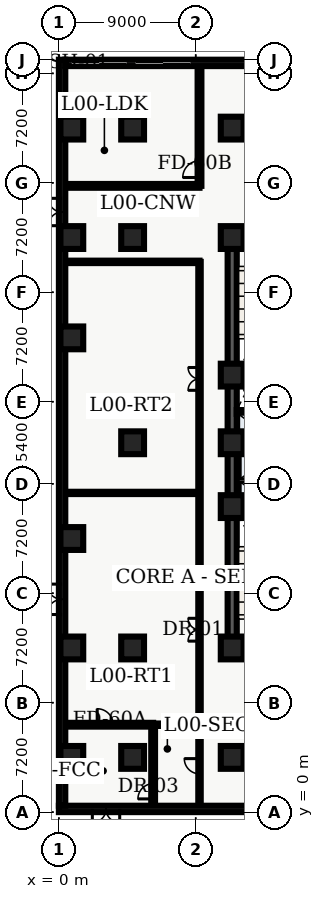
"""IFC4 building model, lengths in metres.
Left out: names, types, materials, properties, quantities, classifications, styles, units other than length and angle.
Written with IfcOpenShell. Run it as: python <this file> out.ifc"""

import sys

from ifc_helpers import new_model, entity, si_unit, converted_unit, direction, frame, origin_with_axes, origin_2d_with_axis, place, context, subcontext, project, spatial, polyline, rectangle, outline, extrude, element, fill, save


model = new_model("IFC4")
c1 = context("Model", 3, precision=1e-05, world=origin_with_axes(), true_north=direction((0.0, 1.0)))
c2 = subcontext(c1, "Body", "Model", "MODEL_VIEW")
j1 = project(units=[si_unit("LENGTHUNIT", "METRE"), converted_unit("PLANEANGLEUNIT", "DEGREE", entity("IfcPlaneAngleMeasure", 0.017), si_unit("PLANEANGLEUNIT", "RADIAN"), dimensions=[0, 0, 0, 0, 0, 0, 0])], contexts=[c1])
p1 = place(None, origin_with_axes())
s1 = spatial("IfcSite", under=j1, at=p1, CompositionType="ELEMENT")
p2 = place(p1, origin_with_axes())
s2 = spatial("IfcBuilding", under=s1, at=p2, CompositionType="ELEMENT")
p3 = place(p2, origin_with_axes())
s3 = spatial("IfcBuildingStorey", under=s2, at=p3, CompositionType="ELEMENT", Elevation=0.0)
p4 = place(p3, frame((11.4, 10.8, 0.0), z_axis=(0.0, 0.0, 1.0), x_axis=(0.0, 1.0, 0.0)))
e1 = element("IfcWall", 1, at=p4, inside=s3, PredefinedType="SHEAR", context=c2, shape_type="SweptSolid", body=[
    extrude(outline(polyline([(0.0, -0.3), (27.0, -0.3), (27.0, 0.3), (0.0, 0.3), (0.0, -0.3)])), origin_with_axes(), (0.0, 0.0, 1.0), 5.46),
])
p5 = place(p3, frame((18.6, 10.8, 0.0), z_axis=(0.0, 0.0, 1.0), x_axis=(-1.0, 0.0, 0.0)))
e2 = element("IfcWall", 2, at=p5, inside=s3, PredefinedType="SHEAR", context=c2, shape_type="SweptSolid", body=[
    extrude(outline(polyline([(0.0, -0.3), (7.2, -0.3), (7.2, 0.3), (0.0, 0.3), (0.0, -0.3)])), origin_with_axes(), (0.0, 0.0, 1.0), 5.46),
])
p6 = place(p5, frame((4.575, 0.0, 0.0), z_axis=(0.0, 0.0, 1.0), x_axis=(1.0, 0.0, 0.0)))
e3 = element("IfcOpeningElement", 3, at=p6, cuts=e2, PredefinedType="OPENING", context=c2, shape_type="SweptSolid", body=[
    extrude(rectangle(XDim=1.05, YDim=0.62, at=origin_2d_with_axis()), origin_with_axes(), (0.0, 0.0, 1.0), 2.15),
])
p7 = place(p3, frame((11.4, 37.8, 0.0), z_axis=(0.0, 0.0, 1.0), x_axis=(1.0, 0.0, 0.0)))
e4 = element("IfcWall", 4, at=p7, inside=s3, PredefinedType="SHEAR", context=c2, shape_type="SweptSolid", body=[
    extrude(outline(polyline([(0.0, -0.3), (7.2, -0.3), (7.2, 0.3), (0.0, 0.3), (0.0, -0.3)])), origin_with_axes(), (0.0, 0.0, 1.0), 5.46),
])
p8 = place(p7, frame((2.625, 0.0, 0.0), z_axis=(0.0, 0.0, 1.0), x_axis=(1.0, 0.0, 0.0)))
e5 = element("IfcOpeningElement", 5, at=p8, cuts=e4, PredefinedType="OPENING", context=c2, shape_type="SweptSolid", body=[
    extrude(rectangle(XDim=1.05, YDim=0.62, at=origin_2d_with_axis()), origin_with_axes(), (0.0, 0.0, 1.0), 2.15),
])
for number, where, z_axis, x_axis in (
    (6, (11.7, 19.825, 0.0), (0.0, 0.0, 1.0), (1.0, 0.0, 0.0)),
    (7, (11.7, 28.775, 0.0), (0.0, 0.0, 1.0), (1.0, 0.0, 0.0)),
):
    element("IfcWall", number, at=place(p3, frame(where, z_axis=z_axis, x_axis=x_axis)), inside=s3, PredefinedType="SHEAR", context=c2, shape_type="SweptSolid", body=[
        extrude(outline(polyline([(0.0, -0.125), (6.6, -0.125), (6.6, 0.125), (0.0, 0.125), (0.0, -0.125)])), origin_with_axes(), (0.0, 0.0, 1.0), 5.46),
    ])
p9 = place(p3, frame((11.7, 24.1, 0.0), z_axis=(0.0, 0.0, 1.0), x_axis=(1.0, 0.0, 0.0)))
e8 = element("IfcWall", 8, at=p9, inside=s3, PredefinedType="SOLIDWALL", context=c2, shape_type="SweptSolid", body=[
    extrude(outline(polyline([(0.0, -0.125), (6.6, -0.125), (6.6, 0.125), (0.0, 0.125), (0.0, -0.125)])), origin_with_axes(), (0.0, 0.0, 1.0), 3.6),
])
p10 = place(p9, frame((3.75, 0.0, 0.0), z_axis=(0.0, 0.0, 1.0), x_axis=(1.0, 0.0, 0.0)))
e9 = element("IfcOpeningElement", 9, at=p10, cuts=e8, PredefinedType="OPENING", context=c2, shape_type="SweptSolid", body=[
    extrude(rectangle(XDim=0.9, YDim=0.27, at=origin_2d_with_axis()), origin_with_axes(), (0.0, 0.0, 1.0), 2.15),
])
p11 = place(p3, frame((11.7, 26.325, 0.0), z_axis=(0.0, 0.0, 1.0), x_axis=(1.0, 0.0, 0.0)))
e10 = element("IfcWall", 10, at=p11, inside=s3, PredefinedType="SOLIDWALL", context=c2, shape_type="SweptSolid", body=[
    extrude(outline(polyline([(0.0, -0.125), (6.6, -0.125), (6.6, 0.125), (0.0, 0.125), (0.0, -0.125)])), origin_with_axes(), (0.0, 0.0, 1.0), 3.6),
])
p12 = place(p11, frame((3.5, 0.0, 0.0), z_axis=(0.0, 0.0, 1.0), x_axis=(1.0, 0.0, 0.0)))
e11 = element("IfcOpeningElement", 11, at=p12, cuts=e10, PredefinedType="OPENING", context=c2, shape_type="SweptSolid", body=[
    extrude(rectangle(XDim=0.9, YDim=0.27, at=origin_2d_with_axis()), origin_with_axes(), (0.0, 0.0, 1.0), 2.15),
])
for number, where, z_axis, x_axis in (
    (12, (11.4, 3.6, 0.0), (0.0, 0.0, 1.0), (1.0, 0.0, 0.0)),
    (13, (11.4, 10.8, 0.0), (0.0, 0.0, 1.0), (1.0, 0.0, 0.0)),
    (14, (11.4, 20.1, 0.0), (0.0, 0.0, 1.0), (1.0, 0.0, 0.0)),
    (15, (11.4, 24.3, 0.0), (0.0, 0.0, 1.0), (1.0, 0.0, 0.0)),
    (16, (11.4, 28.75, 0.0), (0.0, 0.0, 1.0), (1.0, 0.0, 0.0)),
    (17, (11.4, 37.8, 0.0), (0.0, 0.0, 1.0), (1.0, 0.0, 0.0)),
    (18, (11.4, 45.0, 0.0), (0.0, 0.0, 1.0), (1.0, 0.0, 0.0)),
    (19, (4.85, 3.6, 0.0), (0.0, 0.0, 1.0), (1.0, 0.0, 0.0)),
    (20, (4.85, 10.8, 0.0), (0.0, 0.0, 1.0), (1.0, 0.0, 0.0)),
    (21, (4.85, 24.3, 0.0), (0.0, 0.0, 1.0), (1.0, 0.0, 0.0)),
    (22, (4.85, 37.8, 0.0), (0.0, 0.0, 1.0), (1.0, 0.0, 0.0)),
    (23, (4.85, 45.0, 0.0), (0.0, 0.0, 1.0), (1.0, 0.0, 0.0)),
    (24, (0.85, 3.6, 0.0), (0.0, 0.0, 1.0), (1.0, 0.0, 0.0)),
    (25, (0.85, 10.8, 0.0), (0.0, 0.0, 1.0), (1.0, 0.0, 0.0)),
    (26, (0.85, 18.0, 0.0), (0.0, 0.0, 1.0), (1.0, 0.0, 0.0)),
    (27, (0.85, 31.2, 0.0), (0.0, 0.0, 1.0), (1.0, 0.0, 0.0)),
    (28, (0.85, 37.8, 0.0), (0.0, 0.0, 1.0), (1.0, 0.0, 0.0)),
    (29, (0.85, 45.0, 0.0), (0.0, 0.0, 1.0), (1.0, 0.0, 0.0)),
):
    element("IfcColumn", number, at=place(p3, frame(where, z_axis=z_axis, x_axis=x_axis)), inside=s3, PredefinedType="COLUMN", context=c2, shape_type="SweptSolid", body=[
        extrude(rectangle(XDim=1.5, YDim=1.5, at=origin_2d_with_axis()), origin_with_axes(), (0.0, 0.0, 1.0), 5.7),
    ])
p13 = place(p3, frame((0.42, 5.75, 0.0), z_axis=(0.0, 0.0, 1.0), x_axis=(1.0, 0.0, 0.0)))
e30 = element("IfcWall", 30, at=p13, inside=s3, PredefinedType="SOLIDWALL", context=c2, shape_type="SweptSolid", body=[
    extrude(outline(polyline([(0.0, -0.125), (5.78, -0.125), (5.78, 0.125), (0.0, 0.125), (0.0, -0.125)])), origin_with_axes(), (0.0, 0.0, 1.0), 3.2),
])
p14 = place(p13, frame((2.625, 0.0, 0.0), z_axis=(0.0, 0.0, 1.0), x_axis=(1.0, 0.0, 0.0)))
e31 = element("IfcOpeningElement", 31, at=p14, cuts=e30, PredefinedType="OPENING", context=c2, shape_type="SweptSolid", body=[
    extrude(rectangle(XDim=1.05, YDim=0.27, at=origin_2d_with_axis()), origin_with_axes(), (0.0, 0.0, 1.0), 2.15),
])
p15 = place(p3, frame((6.2, 0.42, 0.0), z_axis=(0.0, 0.0, 1.0), x_axis=(0.0, 1.0, 0.0)))
e32 = element("IfcWall", 32, at=p15, inside=s3, PredefinedType="SOLIDWALL", context=c2, shape_type="SweptSolid", body=[
    extrude(outline(polyline([(0.0, -0.125), (5.33, -0.125), (5.33, 0.125), (0.0, 0.125), (0.0, -0.125)])), origin_with_axes(), (0.0, 0.0, 1.0), 3.2),
])
p16 = place(p15, frame((0.95, 0.0, 0.0), z_axis=(0.0, 0.0, 1.0), x_axis=(1.0, 0.0, 0.0)))
e33 = element("IfcOpeningElement", 33, at=p16, cuts=e32, PredefinedType="OPENING", context=c2, shape_type="SweptSolid", body=[
    extrude(rectangle(XDim=1.0, YDim=0.27, at=origin_2d_with_axis()), origin_with_axes(), (0.0, 0.0, 1.0), 2.15),
])
p17 = place(p3, frame((9.25, 0.42, 0.0), z_axis=(0.0, 0.0, 1.0), x_axis=(0.0, 1.0, 0.0)))
e34 = element("IfcWall", 34, at=p17, inside=s3, PredefinedType="PARTITIONING", context=c2, shape_type="SweptSolid", body=[
    extrude(outline(polyline([(0.0, -0.08), (5.33, -0.08), (5.33, 0.08), (0.0, 0.08), (0.0, -0.08)])), origin_with_axes(), (0.0, 0.0, 1.0), 3.2),
])
p18 = place(p17, frame((2.6, 0.0, 0.0), z_axis=(0.0, 0.0, 1.0), x_axis=(1.0, 0.0, 0.0)))
e35 = element("IfcOpeningElement", 35, at=p18, cuts=e34, PredefinedType="OPENING", context=c2, shape_type="SweptSolid", body=[
    extrude(rectangle(XDim=1.0, YDim=0.18, at=origin_2d_with_axis()), origin_with_axes(), (0.0, 0.0, 1.0), 2.15),
])
p19 = place(p3, frame((6.2, 5.75, 0.0), z_axis=(0.0, 0.0, 1.0), x_axis=(1.0, 0.0, 0.0)))
e36 = element("IfcWall", 36, at=p19, inside=s3, PredefinedType="PARTITIONING", context=c2, shape_type="SweptSolid", body=[
    extrude(outline(polyline([(0.0, -0.08), (3.05, -0.08), (3.05, 0.08), (0.0, 0.08), (0.0, -0.08)])), origin_with_axes(), (0.0, 0.0, 1.0), 3.2),
])
p20 = place(p3, frame((9.25, 5.75, 0.0), z_axis=(0.0, 0.0, 1.0), x_axis=(0.0, 1.0, 0.0)))
e37 = element("IfcWall", 37, at=p20, inside=s3, PredefinedType="PARTITIONING", context=c2, shape_type="SweptSolid", body=[
    extrude(outline(polyline([(0.0, -0.08), (30.45, -0.08), (30.45, 0.08), (0.0, 0.08), (0.0, -0.08)])), origin_with_axes(), (0.0, 0.0, 1.0), 3.2),
])
p21 = place(p20, frame((6.25, 0.0, 0.0), z_axis=(0.0, 0.0, 1.0), x_axis=(1.0, 0.0, 0.0)))
e38 = element("IfcOpeningElement", 38, at=p21, cuts=e37, PredefinedType="OPENING", context=c2, shape_type="SweptSolid", body=[
    extrude(rectangle(XDim=1.5, YDim=0.18, at=origin_2d_with_axis()), origin_with_axes(), (0.0, 0.0, 1.0), 2.2),
])
p22 = place(p20, frame((22.75, 0.0, 0.0), z_axis=(0.0, 0.0, 1.0), x_axis=(1.0, 0.0, 0.0)))
e39 = element("IfcOpeningElement", 39, at=p22, cuts=e37, PredefinedType="OPENING", context=c2, shape_type="SweptSolid", body=[
    extrude(rectangle(XDim=1.5, YDim=0.18, at=origin_2d_with_axis()), origin_with_axes(), (0.0, 0.0, 1.0), 2.2),
])
p23 = place(p3, frame((0.42, 36.2, 0.0), z_axis=(0.0, 0.0, 1.0), x_axis=(1.0, 0.0, 0.0)))
e40 = element("IfcWall", 40, at=p23, inside=s3, PredefinedType="PARTITIONING", context=c2, shape_type="SweptSolid", body=[
    extrude(outline(polyline([(0.0, -0.08), (8.83, -0.08), (8.83, 0.08), (0.0, 0.08), (0.0, -0.08)])), origin_with_axes(), (0.0, 0.0, 1.0), 3.2),
])
p24 = place(p3, frame((0.42, 21.0, 0.0), z_axis=(0.0, 0.0, 1.0), x_axis=(1.0, 0.0, 0.0)))
e41 = element("IfcWall", 41, at=p24, inside=s3, PredefinedType="PARTITIONING", context=c2, shape_type="SweptSolid", body=[
    extrude(outline(polyline([(0.0, -0.075), (8.83, -0.075), (8.83, 0.075), (0.0, 0.075), (0.0, -0.075)])), origin_with_axes(), (0.0, 0.0, 1.0), 3.2),
])
p25 = place(p3, frame((0.42, 41.2, 0.0), z_axis=(0.0, 0.0, 1.0), x_axis=(1.0, 0.0, 0.0)))
e42 = element("IfcWall", 42, at=p25, inside=s3, PredefinedType="SOLIDWALL", context=c2, shape_type="SweptSolid", body=[
    extrude(outline(polyline([(0.0, -0.125), (8.83, -0.125), (8.83, 0.125), (0.0, 0.125), (0.0, -0.125)])), origin_with_axes(), (0.0, 0.0, 1.0), 3.2),
])
p26 = place(p3, frame((9.25, 41.2, 0.0), z_axis=(0.0, 0.0, 1.0), x_axis=(0.0, 1.0, 0.0)))
e43 = element("IfcWall", 43, at=p26, inside=s3, PredefinedType="SOLIDWALL", context=c2, shape_type="SweptSolid", body=[
    extrude(outline(polyline([(0.0, -0.125), (7.88, -0.125), (7.88, 0.125), (0.0, 0.125), (0.0, -0.125)])), origin_with_axes(), (0.0, 0.0, 1.0), 3.2),
])
p27 = place(p26, frame((1.1, 0.0, 0.0), z_axis=(0.0, 0.0, 1.0), x_axis=(1.0, 0.0, 0.0)))
e44 = element("IfcOpeningElement", 44, at=p27, cuts=e43, PredefinedType="OPENING", context=c2, shape_type="SweptSolid", body=[
    extrude(rectangle(XDim=1.1, YDim=0.27, at=origin_2d_with_axis()), origin_with_axes(), (0.0, 0.0, 1.0), 2.15),
])
p28 = place(p3, frame((67.98, 0.21, 0.0), z_axis=(0.0, 0.0, 1.0), x_axis=(-1.0, 0.0, 0.0)))
e45 = element("IfcWall", 45, at=p28, inside=s3, PredefinedType="SOLIDWALL", context=c2, shape_type="SweptSolid", body=[
    extrude(outline(polyline([(0.0, -0.21), (67.98, -0.21), (67.98, 0.21), (0.0, 0.21), (0.0, -0.21)])), origin_with_axes(), (0.0, 0.0, 1.0), 5.46),
])
p29 = place(p28, frame((64.88, 0.0, 0.0), z_axis=(0.0, 0.0, 1.0), x_axis=(1.0, 0.0, 0.0)))
e46 = element("IfcOpeningElement", 46, at=p29, cuts=e45, PredefinedType="OPENING", context=c2, shape_type="SweptSolid", body=[
    extrude(rectangle(XDim=1.8, YDim=0.44, at=origin_2d_with_axis()), origin_with_axes(), (0.0, 0.0, 1.0), 2.2),
])
p30 = place(p28, frame((54.18, 0.0, 0.0), z_axis=(0.0, 0.0, 1.0), x_axis=(1.0, 0.0, 0.0)))
e47 = element("IfcOpeningElement", 47, at=p30, cuts=e45, PredefinedType="OPENING", context=c2, shape_type="SweptSolid", body=[
    extrude(rectangle(XDim=1.8, YDim=0.44, at=origin_2d_with_axis()), origin_with_axes(), (0.0, 0.0, 1.0), 2.2),
])
p31 = place(p28, frame((48.18, 0.0, 0.0), z_axis=(0.0, 0.0, 1.0), x_axis=(1.0, 0.0, 0.0)))
e48 = element("IfcOpeningElement", 48, at=p31, cuts=e45, PredefinedType="OPENING", context=c2, shape_type="SweptSolid", body=[
    extrude(rectangle(XDim=1.8, YDim=0.44, at=origin_2d_with_axis()), origin_with_axes(), (0.0, 0.0, 1.0), 2.2),
])
p32 = place(p28, frame((44.98, 0.0, 0.0), z_axis=(0.0, 0.0, 1.0), x_axis=(1.0, 0.0, 0.0)))
e49 = element("IfcOpeningElement", 49, at=p32, cuts=e45, PredefinedType="OPENING", context=c2, shape_type="SweptSolid", body=[
    extrude(rectangle(XDim=2.0, YDim=0.44, at=origin_2d_with_axis()), origin_with_axes(), (0.0, 0.0, 1.0), 2.4),
])
p33 = place(p28, frame((34.98, 0.0, 0.0), z_axis=(0.0, 0.0, 1.0), x_axis=(1.0, 0.0, 0.0)))
e50 = element("IfcOpeningElement", 50, at=p33, cuts=e45, PredefinedType="OPENING", context=c2, shape_type="SweptSolid", body=[
    extrude(rectangle(XDim=2.0, YDim=0.44, at=origin_2d_with_axis()), origin_with_axes(), (0.0, 0.0, 1.0), 2.4),
])
p34 = place(p28, frame((25.78, 0.0, 0.0), z_axis=(0.0, 0.0, 1.0), x_axis=(1.0, 0.0, 0.0)))
e51 = element("IfcOpeningElement", 51, at=p34, cuts=e45, PredefinedType="OPENING", context=c2, shape_type="SweptSolid", body=[
    extrude(rectangle(XDim=1.8, YDim=0.44, at=origin_2d_with_axis()), origin_with_axes(), (0.0, 0.0, 1.0), 2.2),
])
p35 = place(p28, frame((12.58, 0.0, 0.0), z_axis=(0.0, 0.0, 1.0), x_axis=(1.0, 0.0, 0.0)))
e52 = element("IfcOpeningElement", 52, at=p35, cuts=e45, PredefinedType="OPENING", context=c2, shape_type="SweptSolid", body=[
    extrude(rectangle(XDim=2.0, YDim=0.44, at=origin_2d_with_axis()), origin_with_axes(), (0.0, 0.0, 1.0), 2.4),
])
p36 = place(p28, frame((4.48, 0.0, 0.0), z_axis=(0.0, 0.0, 1.0), x_axis=(1.0, 0.0, 0.0)))
e53 = element("IfcOpeningElement", 53, at=p36, cuts=e45, PredefinedType="OPENING", context=c2, shape_type="SweptSolid", body=[
    extrude(rectangle(XDim=2.0, YDim=0.44, at=origin_2d_with_axis()), origin_with_axes(), (0.0, 0.0, 1.0), 2.4),
])
p37 = place(p3, frame((0.21, 0.42, 0.0), z_axis=(0.0, 0.0, 1.0), x_axis=(0.0, 1.0, 0.0)))
e54 = element("IfcWall", 54, at=p37, inside=s3, PredefinedType="SOLIDWALL", context=c2, shape_type="SweptSolid", body=[
    extrude(outline(polyline([(0.0, -0.21), (49.08, -0.21), (49.08, 0.21), (0.0, 0.21), (0.0, -0.21)])), origin_with_axes(), (0.0, 0.0, 1.0), 5.46),
])
p38 = place(p37, frame((39.06, 0.0, 0.0), z_axis=(0.0, 0.0, 1.0), x_axis=(1.0, 0.0, 0.0)))
e55 = element("IfcOpeningElement", 55, at=p38, cuts=e54, PredefinedType="OPENING", context=c2, shape_type="SweptSolid", body=[
    extrude(rectangle(XDim=1.8, YDim=0.44, at=origin_2d_with_axis()), origin_with_axes(), (0.0, 0.0, 1.0), 2.2),
])
p39 = place(p37, frame((13.58, 0.0, 0.0), z_axis=(0.0, 0.0, 1.0), x_axis=(1.0, 0.0, 0.0)))
e56 = element("IfcOpeningElement", 56, at=p39, cuts=e54, PredefinedType="OPENING", context=c2, shape_type="SweptSolid", body=[
    extrude(rectangle(XDim=2.0, YDim=0.44, at=origin_2d_with_axis()), origin_with_axes(), (0.0, 0.0, 1.0), 2.4),
])
p40 = place(p3, frame((0.42, 49.29, 0.0), z_axis=(0.0, 0.0, 1.0), x_axis=(1.0, 0.0, 0.0)))
e57 = element("IfcWall", 57, at=p40, inside=s3, PredefinedType="SOLIDWALL", context=c2, shape_type="SweptSolid", body=[
    extrude(outline(polyline([(0.0, -0.21), (53.58, -0.21), (53.58, 0.21), (0.0, 0.21), (0.0, -0.21)])), origin_with_axes(), (0.0, 0.0, 1.0), 5.46),
])
p41 = place(p40, frame((15.58, 0.0, 0.0), z_axis=(0.0, 0.0, 1.0), x_axis=(1.0, 0.0, 0.0)))
e58 = element("IfcOpeningElement", 58, at=p41, cuts=e57, PredefinedType="OPENING", context=c2, shape_type="SweptSolid", body=[
    extrude(rectangle(XDim=1.8, YDim=0.44, at=origin_2d_with_axis()), origin_with_axes(), (0.0, 0.0, 1.0), 2.2),
])
p42 = place(p40, frame((31.58, 0.0, 0.0), z_axis=(0.0, 0.0, 1.0), x_axis=(1.0, 0.0, 0.0)))
e59 = element("IfcOpeningElement", 59, at=p42, cuts=e57, PredefinedType="OPENING", context=c2, shape_type="SweptSolid", body=[
    extrude(rectangle(XDim=1.8, YDim=0.44, at=origin_2d_with_axis()), origin_with_axes(), (0.0, 0.0, 1.0), 2.2),
])
p43 = place(p40, frame((45.58, 0.0, 0.0), z_axis=(0.0, 0.0, 1.0), x_axis=(1.0, 0.0, 0.0)))
e60 = element("IfcOpeningElement", 60, at=p43, cuts=e57, PredefinedType="OPENING", context=c2, shape_type="SweptSolid", body=[
    extrude(rectangle(XDim=1.8, YDim=0.44, at=origin_2d_with_axis()), origin_with_axes(), (0.0, 0.0, 1.0), 2.2),
])
p44 = place(p40, frame((2.23, 0.0, 0.0), z_axis=(0.0, 0.0, 1.0), x_axis=(1.0, 0.0, 0.0)))
e61 = element("IfcOpeningElement", 61, at=p44, cuts=e57, PredefinedType="OPENING", context=c2, shape_type="SweptSolid", body=[
    extrude(rectangle(XDim=3.6, YDim=0.44, at=origin_2d_with_axis()), origin_with_axes(), (0.0, 0.0, 1.0), 4.2),
])
p45 = place(p40, frame((6.43, 0.0, 0.0), z_axis=(0.0, 0.0, 1.0), x_axis=(1.0, 0.0, 0.0)))
e62 = element("IfcOpeningElement", 62, at=p45, cuts=e57, PredefinedType="OPENING", context=c2, shape_type="SweptSolid", body=[
    extrude(rectangle(XDim=3.6, YDim=0.44, at=origin_2d_with_axis()), origin_with_axes(), (0.0, 0.0, 1.0), 4.2),
])
p46 = place(p13, frame((2.625, 0.0, 0.0), z_axis=(0.0, 0.0, 1.0), x_axis=(1.0, 0.0, 0.0)))
e63 = element("IfcDoor", 63, at=p46, inside=s3, OperationType="SINGLE_SWING_LEFT", PredefinedType="DOOR", context=c2, shape_type="SweptSolid", body=[
    extrude(rectangle(XDim=1.05, YDim=0.09, at=origin_2d_with_axis()), origin_with_axes(), (0.0, 0.0, 1.0), 2.15),
])
fill(e31, e63)
p47 = place(p15, frame((0.95, 0.0, 0.0), z_axis=(0.0, 0.0, 1.0), x_axis=(1.0, 0.0, 0.0)))
e64 = element("IfcDoor", 64, at=p47, inside=s3, OperationType="SINGLE_SWING_LEFT", PredefinedType="DOOR", context=c2, shape_type="SweptSolid", body=[
    extrude(rectangle(XDim=1.0, YDim=0.09, at=origin_2d_with_axis()), origin_with_axes(), (0.0, 0.0, 1.0), 2.15),
])
fill(e33, e64)
p48 = place(p17, frame((2.6, 0.0, 0.0), z_axis=(0.0, 0.0, 1.0), x_axis=(1.0, 0.0, 0.0)))
e65 = element("IfcDoor", 65, at=p48, inside=s3, OperationType="SINGLE_SWING_RIGHT", PredefinedType="DOOR", context=c2, shape_type="SweptSolid", body=[
    extrude(rectangle(XDim=1.0, YDim=0.09, at=origin_2d_with_axis()), origin_with_axes(), (0.0, 0.0, 1.0), 2.15),
])
fill(e35, e65)
p49 = place(p20, frame((6.25, 0.0, 0.0), z_axis=(0.0, 0.0, 1.0), x_axis=(1.0, 0.0, 0.0)))
e66 = element("IfcDoor", 66, at=p49, inside=s3, OperationType="DOUBLE_DOOR_SINGLE_SWING", PredefinedType="DOOR", context=c2, shape_type="SweptSolid", body=[
    extrude(rectangle(XDim=1.5, YDim=0.09, at=origin_2d_with_axis()), origin_with_axes(), (0.0, 0.0, 1.0), 2.2),
])
fill(e38, e66)
p50 = place(p20, frame((22.75, 0.0, 0.0), z_axis=(0.0, 0.0, 1.0), x_axis=(1.0, 0.0, 0.0)))
e67 = element("IfcDoor", 67, at=p50, inside=s3, OperationType="DOUBLE_DOOR_SINGLE_SWING", PredefinedType="DOOR", context=c2, shape_type="SweptSolid", body=[
    extrude(rectangle(XDim=1.5, YDim=0.09, at=origin_2d_with_axis()), origin_with_axes(), (0.0, 0.0, 1.0), 2.2),
])
fill(e39, e67)
p51 = place(p26, frame((1.1, 0.0, 0.0), z_axis=(0.0, 0.0, 1.0), x_axis=(1.0, 0.0, 0.0)))
e68 = element("IfcDoor", 68, at=p51, inside=s3, OperationType="SINGLE_SWING_LEFT", PredefinedType="DOOR", context=c2, shape_type="SweptSolid", body=[
    extrude(rectangle(XDim=1.1, YDim=0.09, at=origin_2d_with_axis()), origin_with_axes(), (0.0, 0.0, 1.0), 2.15),
])
fill(e44, e68)
p52 = place(p28, frame((64.88, 0.0, 0.0), z_axis=(0.0, 0.0, 1.0), x_axis=(1.0, 0.0, 0.0)))
e69 = element("IfcDoor", 69, at=p52, inside=s3, OperationType="DOUBLE_DOOR_SINGLE_SWING", PredefinedType="DOOR", context=c2, shape_type="SweptSolid", body=[
    extrude(rectangle(XDim=1.8, YDim=0.09, at=origin_2d_with_axis()), origin_with_axes(), (0.0, 0.0, 1.0), 2.2),
])
fill(e46, e69)
p53 = place(p37, frame((39.06, 0.0, 0.0), z_axis=(0.0, 0.0, 1.0), x_axis=(1.0, 0.0, 0.0)))
e70 = element("IfcDoor", 70, at=p53, inside=s3, OperationType="DOUBLE_DOOR_SINGLE_SWING", PredefinedType="DOOR", context=c2, shape_type="SweptSolid", body=[
    extrude(rectangle(XDim=1.8, YDim=0.09, at=origin_2d_with_axis()), origin_with_axes(), (0.0, 0.0, 1.0), 2.2),
])
fill(e55, e70)
p54 = place(p37, frame((13.58, 0.0, 0.0), z_axis=(0.0, 0.0, 1.0), x_axis=(1.0, 0.0, 0.0)))
e71 = element("IfcDoor", 71, at=p54, inside=s3, OperationType="DOUBLE_DOOR_SINGLE_SWING", PredefinedType="DOOR", context=c2, shape_type="SweptSolid", body=[
    extrude(rectangle(XDim=2.0, YDim=0.09, at=origin_2d_with_axis()), origin_with_axes(), (0.0, 0.0, 1.0), 2.4),
])
fill(e56, e71)
p55 = place(p40, frame((2.23, 0.0, 0.0), z_axis=(0.0, 0.0, 1.0), x_axis=(1.0, 0.0, 0.0)))
e72 = element("IfcDoor", 72, at=p55, inside=s3, OperationType="ROLLINGUP", PredefinedType="DOOR", context=c2, shape_type="SweptSolid", body=[
    extrude(rectangle(XDim=3.6, YDim=0.09, at=origin_2d_with_axis()), origin_with_axes(), (0.0, 0.0, 1.0), 4.2),
])
fill(e61, e72)
p56 = place(p40, frame((6.43, 0.0, 0.0), z_axis=(0.0, 0.0, 1.0), x_axis=(1.0, 0.0, 0.0)))
e73 = element("IfcDoor", 73, at=p56, inside=s3, OperationType="ROLLINGUP", PredefinedType="DOOR", context=c2, shape_type="SweptSolid", body=[
    extrude(rectangle(XDim=3.6, YDim=0.09, at=origin_2d_with_axis()), origin_with_axes(), (0.0, 0.0, 1.0), 4.2),
])
fill(e62, e73)
save(model, sys.argv[1])
